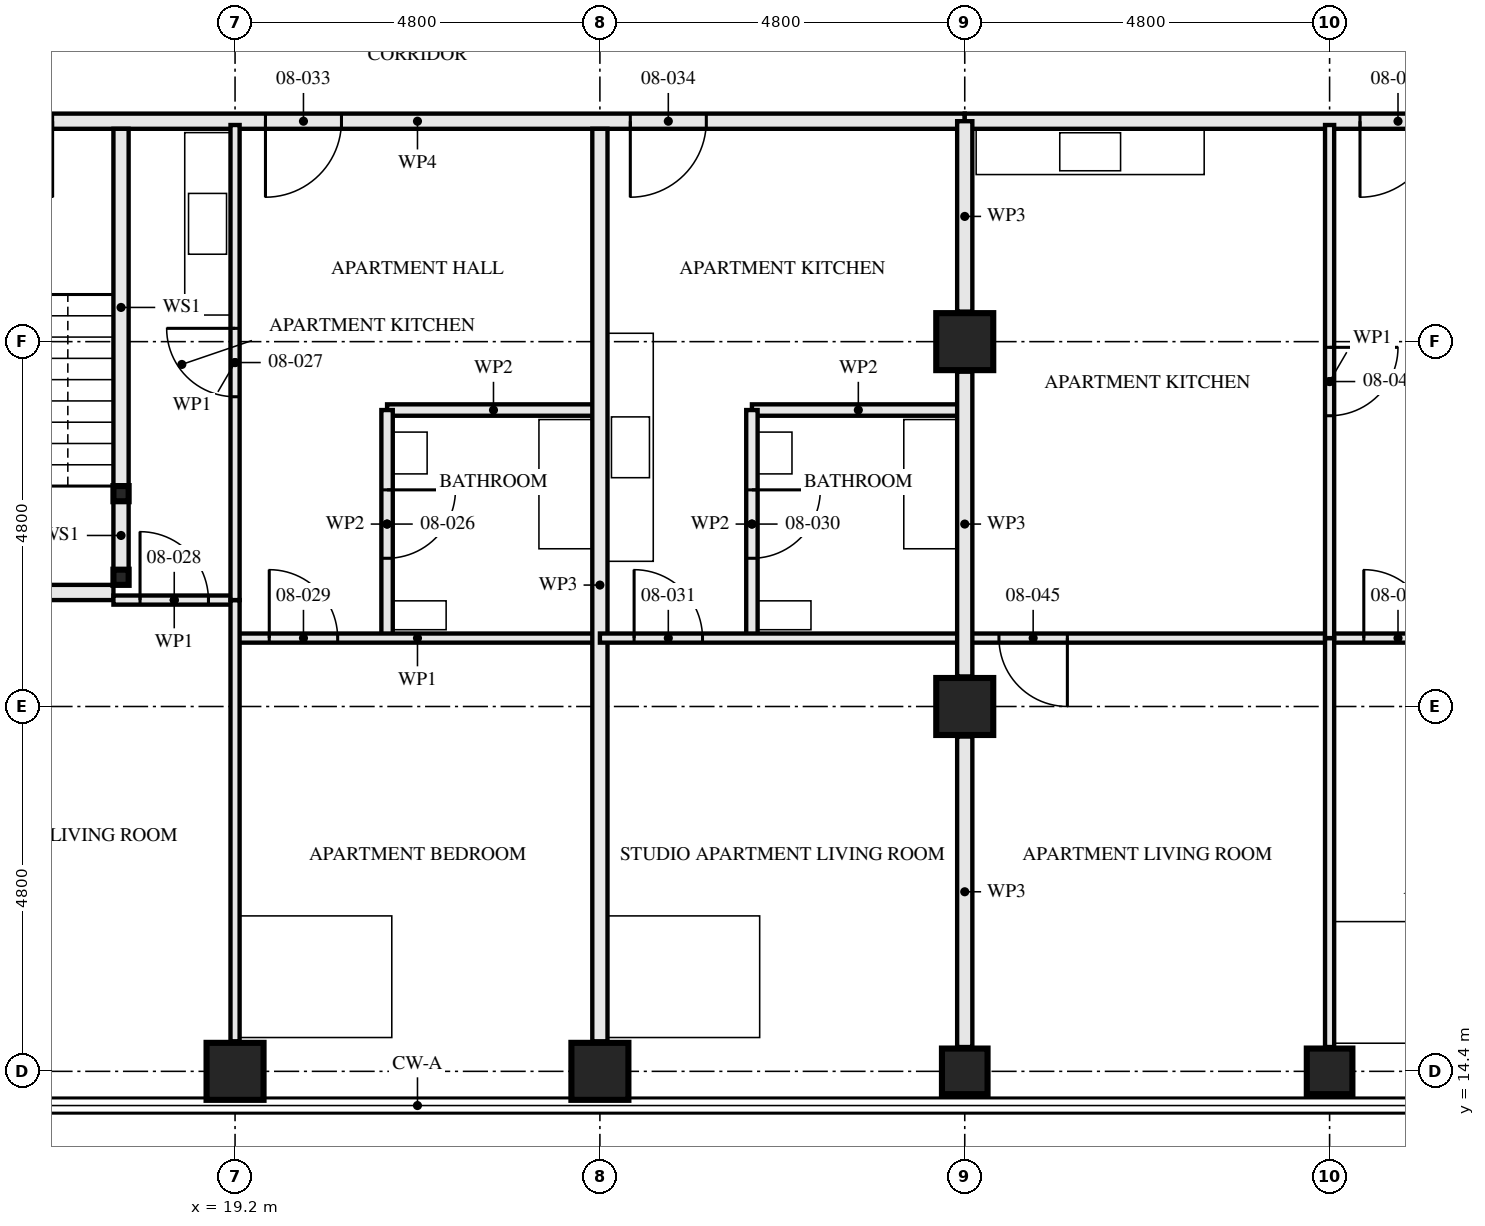
"""IFC4 building model, lengths in metres.
Left out: names, types, materials, properties, quantities, classifications, styles, units other than length and angle.
Written with IfcOpenShell. Run it as: python <this file> out.ifc"""

import sys

from ifc_helpers import new_model, si_unit, direction, frame, frame_2d, origin, origin_2d, place, context, subcontext, project, spatial, rectangle, hollow_rectangle, extrude, element, fill, save


model = new_model("IFC4")
c1 = context("Model", 3, precision=1e-05, world=origin(), true_north=direction((0.0, 1.0)))
c2 = subcontext(c1, "Body", "Model", "MODEL_VIEW")
j1 = project(units=[si_unit("LENGTHUNIT", "METRE"), si_unit("PLANEANGLEUNIT", "RADIAN")], contexts=[c1])
p1 = place(None, origin())
s1 = spatial("IfcSite", under=j1, at=p1, CompositionType="ELEMENT")
p2 = place(p1, origin())
s2 = spatial("IfcBuilding", under=s1, at=p2, CompositionType="ELEMENT")
p3 = place(p2, frame((0.0, 0.0, 34.0)))
s3 = spatial("IfcBuildingStorey", under=s2, at=p3, CompositionType="ELEMENT", Elevation=34.0)
for number, where, z_axis, x_axis in (
    (1, (19.2, 14.4, 0.0), (0.0, 0.0, 1.0), (0.0, 1.0, 0.0)),
    (2, (24.0, 14.4, 0.0), (0.0, 0.0, 1.0), (0.0, 1.0, 0.0)),
):
    element("IfcColumn", number, at=place(p3, frame(where, z_axis=z_axis, x_axis=x_axis)), inside=s3, PredefinedType="COLUMN", context=c2, shape_type="SweptSolid", body=[
        extrude(hollow_rectangle(XDim=0.75, YDim=0.75, WallThickness=0.08, at=origin_2d()), origin(), (0.0, 0.0, 1.0), 3.5),
    ])
p4 = place(p3, frame((28.8, 14.4, 0.0), z_axis=(0.0, 0.0, 1.0), x_axis=(0.0, 1.0, 0.0)))
e3 = element("IfcColumn", 3, at=p4, inside=s3, PredefinedType="COLUMN", context=c2, shape_type="SweptSolid", body=[
    extrude(hollow_rectangle(XDim=0.6, YDim=0.6, WallThickness=0.08, at=origin_2d()), origin(), (0.0, 0.0, 1.0), 3.5),
])
for number, where, z_axis, x_axis in (
    (4, (28.8, 19.2, 0.0), (0.0, 0.0, 1.0), (1.0, 0.0, 0.0)),
    (5, (28.8, 24.0, 0.0), (0.0, 0.0, 1.0), (1.0, 0.0, 0.0)),
):
    element("IfcColumn", number, at=place(p3, frame(where, z_axis=z_axis, x_axis=x_axis)), inside=s3, PredefinedType="COLUMN", context=c2, shape_type="SweptSolid", body=[
        extrude(hollow_rectangle(XDim=0.75, YDim=0.75, WallThickness=0.08, at=origin_2d()), origin(), (0.0, 0.0, 1.0), 3.5),
    ])
p5 = place(p3, frame((33.6, 14.4, 0.0), z_axis=(0.0, 0.0, 1.0), x_axis=(0.0, 1.0, 0.0)))
e6 = element("IfcColumn", 6, at=p5, inside=s3, PredefinedType="COLUMN", context=c2, shape_type="SweptSolid", body=[
    extrude(hollow_rectangle(XDim=0.6, YDim=0.6, WallThickness=0.08, at=origin_2d()), origin(), (0.0, 0.0, 1.0), 3.5),
])
for number, where, z_axis, x_axis in (
    (7, (17.7, 20.9, 0.0), (0.0, 0.0, 1.0), (1.0, 0.0, 0.0)),
    (8, (17.7, 22.0, 0.0), (0.0, 0.0, 1.0), (1.0, 0.0, 0.0)),
):
    element("IfcColumn", number, at=place(p3, frame(where, z_axis=z_axis, x_axis=x_axis)), inside=s3, PredefinedType="COLUMN", context=c2, shape_type="SweptSolid", body=[
        extrude(hollow_rectangle(XDim=0.2, YDim=0.2, WallThickness=0.008, at=origin_2d()), origin(), (0.0, 0.0, 1.0), 3.33),
    ])
p6 = place(p3, frame((17.7, 21.0, 0.0), z_axis=(0.0, 0.0, 1.0), x_axis=(0.0, 1.0, 0.0)))
e9 = element("IfcWall", 9, at=p6, inside=s3, PredefinedType="SOLIDWALL", context=c2, shape_type="SweptSolid", body=[
    extrude(rectangle(XDim=0.9, YDim=0.2, at=frame_2d((0.45, 0.0))), origin(), (0.0, 0.0, 1.0), 2.99),
])
p7 = place(p3, frame((17.7, 22.1, 0.0), z_axis=(0.0, 0.0, 1.0), x_axis=(0.0, 1.0, 0.0)))
e10 = element("IfcWall", 10, at=p7, inside=s3, PredefinedType="SOLIDWALL", context=c2, shape_type="SweptSolid", body=[
    extrude(rectangle(XDim=4.7, YDim=0.2, at=frame_2d((2.35, 0.0))), origin(), (0.0, 0.0, 1.0), 2.99),
])
p8 = place(p3, frame((15.0, 20.7, 0.0), z_axis=(0.0, 0.0, 1.0), x_axis=(1.0, 0.0, 0.0)))
e11 = element("IfcWall", 11, at=p8, inside=s3, PredefinedType="SOLIDWALL", context=c2, shape_type="SweptSolid", body=[
    extrude(rectangle(XDim=2.6, YDim=0.2, at=frame_2d((1.3, 0.0))), origin(), (0.0, 0.0, 1.0), 3.33),
])
p9 = place(p3, frame((21.2, 20.1, 0.0), z_axis=(0.0, 0.0, 1.0), x_axis=(0.0, 1.0, 0.0)))
e12 = element("IfcWall", 12, at=p9, inside=s3, PredefinedType="PARTITIONING", context=c2, shape_type="SweptSolid", body=[
    extrude(rectangle(XDim=3.0, YDim=0.15, at=frame_2d((1.5, 0.0))), origin(), (0.0, 0.0, 1.0), 3.33),
])
p10 = place(p9, frame((1.05, 0.0, 0.0)))
e13 = element("IfcOpeningElement", 13, at=p10, cuts=e12, PredefinedType="OPENING", context=c2, shape_type="SweptSolid", body=[
    extrude(rectangle(XDim=0.9, YDim=2.1, at=frame_2d((0.45, 1.05))), frame((0.0, 0.085, 0.0), z_axis=(0.0, -1.0, 0.0), x_axis=(1.0, 0.0, 0.0)), (0.0, 0.0, 1.0), 0.171),
])
p11 = place(p3, frame((21.2, 23.1, 0.0), z_axis=(0.0, 0.0, 1.0), x_axis=(1.0, 0.0, 0.0)))
e14 = element("IfcWall", 14, at=p11, inside=s3, PredefinedType="PARTITIONING", context=c2, shape_type="SweptSolid", body=[
    extrude(rectangle(XDim=2.8, YDim=0.15, at=frame_2d((1.4, 0.0))), origin(), (0.0, 0.0, 1.0), 3.33),
])
p12 = place(p3, frame((19.2, 20.6, 0.0), z_axis=(0.0, 0.0, 1.0), x_axis=(0.0, 1.0, 0.0)))
e15 = element("IfcWall", 15, at=p12, inside=s3, PredefinedType="PARTITIONING", context=c2, shape_type="SweptSolid", body=[
    extrude(rectangle(XDim=6.25, YDim=0.12, at=frame_2d((3.125, 0.0))), origin(), (0.0, 0.0, 1.0), 2.55),
])
p13 = place(p12, frame((2.675, 0.0, 0.0)))
e16 = element("IfcOpeningElement", 16, at=p13, cuts=e15, PredefinedType="OPENING", context=c2, shape_type="SweptSolid", body=[
    extrude(rectangle(XDim=0.9, YDim=2.1, at=frame_2d((0.45, 1.05))), frame((0.0, 0.071, 0.0), z_axis=(0.0, -1.0, 0.0), x_axis=(1.0, 0.0, 0.0)), (0.0, 0.0, 1.0), 0.141),
])
p14 = place(p3, frame((17.6, 20.6, 0.0), z_axis=(0.0, 0.0, 1.0), x_axis=(1.0, 0.0, 0.0)))
e17 = element("IfcWall", 17, at=p14, inside=s3, PredefinedType="PARTITIONING", context=c2, shape_type="SweptSolid", body=[
    extrude(rectangle(XDim=1.6, YDim=0.12, at=frame_2d((0.8, 0.0))), origin(), (0.0, 0.0, 1.0), 3.33),
])
p15 = place(p14, frame((0.35, 0.0, 0.0)))
e18 = element("IfcOpeningElement", 18, at=p15, cuts=e17, PredefinedType="OPENING", context=c2, shape_type="SweptSolid", body=[
    extrude(rectangle(XDim=0.9, YDim=2.1, at=frame_2d((0.45, 1.05))), frame((0.0, 0.071, 0.0), z_axis=(0.0, -1.0, 0.0), x_axis=(1.0, 0.0, 0.0)), (0.0, 0.0, 1.0), 0.141),
])
p16 = place(p3, frame((19.2, 20.1, 0.0), z_axis=(0.0, 0.0, 1.0), x_axis=(1.0, 0.0, 0.0)))
e19 = element("IfcWall", 19, at=p16, inside=s3, PredefinedType="PARTITIONING", context=c2, shape_type="SweptSolid", body=[
    extrude(rectangle(XDim=4.8, YDim=0.12, at=frame_2d((2.4, 0.0))), origin(), (0.0, 0.0, 1.0), 3.33),
])
p17 = place(p16, frame((0.45, 0.0, 0.0)))
e20 = element("IfcOpeningElement", 20, at=p17, cuts=e19, PredefinedType="OPENING", context=c2, shape_type="SweptSolid", body=[
    extrude(rectangle(XDim=0.9, YDim=2.1, at=frame_2d((0.45, 1.05))), frame((0.0, 0.071, 0.0), z_axis=(0.0, -1.0, 0.0), x_axis=(1.0, 0.0, 0.0)), (0.0, 0.0, 1.0), 0.141),
])
p18 = place(p3, frame((19.2, 14.795, 0.0), z_axis=(0.0, 0.0, 1.0), x_axis=(0.0, 1.0, 0.0)))
e21 = element("IfcWall", 21, at=p18, inside=s3, PredefinedType="PARTITIONING", context=c2, shape_type="SweptSolid", body=[
    extrude(rectangle(XDim=5.805, YDim=0.12, at=frame_2d((2.903, 0.0))), origin(), (0.0, 0.0, 1.0), 2.55),
])
p19 = place(p3, frame((24.0, 14.795, 0.0), z_axis=(0.0, 0.0, 1.0), x_axis=(0.0, 1.0, 0.0)))
e22 = element("IfcWall", 22, at=p19, inside=s3, PredefinedType="PARTITIONING", context=c2, shape_type="SweptSolid", body=[
    extrude(rectangle(XDim=12.005, YDim=0.2, at=frame_2d((6.002, 0.0))), origin(), (0.0, 0.0, 1.0), 2.55),
])
p20 = place(p3, frame((26.0, 20.1, 0.0), z_axis=(0.0, 0.0, 1.0), x_axis=(0.0, 1.0, 0.0)))
e23 = element("IfcWall", 23, at=p20, inside=s3, PredefinedType="PARTITIONING", context=c2, shape_type="SweptSolid", body=[
    extrude(rectangle(XDim=3.0, YDim=0.15, at=frame_2d((1.5, 0.0))), origin(), (0.0, 0.0, 1.0), 3.33),
])
p21 = place(p20, frame((1.05, 0.0, 0.0)))
e24 = element("IfcOpeningElement", 24, at=p21, cuts=e23, PredefinedType="OPENING", context=c2, shape_type="SweptSolid", body=[
    extrude(rectangle(XDim=0.9, YDim=2.1, at=frame_2d((0.45, 1.05))), frame((0.0, 0.085, 0.0), z_axis=(0.0, -1.0, 0.0), x_axis=(1.0, 0.0, 0.0)), (0.0, 0.0, 1.0), 0.171),
])
p22 = place(p3, frame((26.0, 23.1, 0.0), z_axis=(0.0, 0.0, 1.0), x_axis=(1.0, 0.0, 0.0)))
e25 = element("IfcWall", 25, at=p22, inside=s3, PredefinedType="PARTITIONING", context=c2, shape_type="SweptSolid", body=[
    extrude(rectangle(XDim=2.8, YDim=0.15, at=frame_2d((1.4, 0.0))), origin(), (0.0, 0.0, 1.0), 3.33),
])
p23 = place(p3, frame((24.0, 20.1, 0.0), z_axis=(0.0, 0.0, 1.0), x_axis=(1.0, 0.0, 0.0)))
e26 = element("IfcWall", 26, at=p23, inside=s3, PredefinedType="PARTITIONING", context=c2, shape_type="SweptSolid", body=[
    extrude(rectangle(XDim=4.8, YDim=0.12, at=frame_2d((2.4, 0.0))), origin(), (0.0, 0.0, 1.0), 3.33),
])
p24 = place(p23, frame((0.45, 0.0, 0.0)))
e27 = element("IfcOpeningElement", 27, at=p24, cuts=e26, PredefinedType="OPENING", context=c2, shape_type="SweptSolid", body=[
    extrude(rectangle(XDim=0.9, YDim=2.1, at=frame_2d((0.45, 1.05))), frame((0.0, 0.071, 0.0), z_axis=(0.0, -1.0, 0.0), x_axis=(1.0, 0.0, 0.0)), (0.0, 0.0, 1.0), 0.141),
])
p25 = place(p3, frame((14.4, 26.9, 0.0), z_axis=(0.0, 0.0, 1.0), x_axis=(1.0, 0.0, 0.0)))
e28 = element("IfcWall", 28, at=p25, inside=s3, PredefinedType="PARTITIONING", context=c2, shape_type="SweptSolid", body=[
    extrude(rectangle(XDim=14.4, YDim=0.2, at=frame_2d((7.2, 0.0))), origin(), (0.0, 0.0, 1.0), 2.55),
])
p26 = place(p25, frame((1.4, 0.0, 0.0)))
e29 = element("IfcOpeningElement", 29, at=p26, cuts=e28, PredefinedType="OPENING", context=c2, shape_type="SweptSolid", body=[
    extrude(rectangle(XDim=1.0, YDim=2.1, at=frame_2d((0.5, 1.05))), frame((0.0, 0.111, 0.0), z_axis=(0.0, -1.0, 0.0), x_axis=(1.0, 0.0, 0.0)), (0.0, 0.0, 1.0), 0.221),
])
p27 = place(p25, frame((5.2, 0.0, 0.0)))
e30 = element("IfcOpeningElement", 30, at=p27, cuts=e28, PredefinedType="OPENING", context=c2, shape_type="SweptSolid", body=[
    extrude(rectangle(XDim=1.0, YDim=2.1, at=frame_2d((0.5, 1.05))), frame((0.0, 0.111, 0.0), z_axis=(0.0, -1.0, 0.0), x_axis=(1.0, 0.0, 0.0)), (0.0, 0.0, 1.0), 0.221),
])
p28 = place(p25, frame((10.0, 0.0, 0.0)))
e31 = element("IfcOpeningElement", 31, at=p28, cuts=e28, PredefinedType="OPENING", context=c2, shape_type="SweptSolid", body=[
    extrude(rectangle(XDim=1.0, YDim=2.1, at=frame_2d((0.5, 1.05))), frame((0.0, 0.111, 0.0), z_axis=(0.0, -1.0, 0.0), x_axis=(1.0, 0.0, 0.0)), (0.0, 0.0, 1.0), 0.221),
])
p29 = place(p3, frame((33.6, 20.1, 0.0), z_axis=(0.0, 0.0, 1.0), x_axis=(0.0, 1.0, 0.0)))
e32 = element("IfcWall", 32, at=p29, inside=s3, PredefinedType="PARTITIONING", context=c2, shape_type="SweptSolid", body=[
    extrude(rectangle(XDim=6.75, YDim=0.12, at=frame_2d((3.375, 0.0))), origin(), (0.0, 0.0, 1.0), 2.55),
])
p30 = place(p29, frame((2.925, 0.0, 0.0)))
e33 = element("IfcOpeningElement", 33, at=p30, cuts=e32, PredefinedType="OPENING", context=c2, shape_type="SweptSolid", body=[
    extrude(rectangle(XDim=0.9, YDim=2.1, at=frame_2d((0.45, 1.05))), frame((0.0, 0.071, 0.0), z_axis=(0.0, -1.0, 0.0), x_axis=(1.0, 0.0, 0.0)), (0.0, 0.0, 1.0), 0.141),
])
p31 = place(p3, frame((28.8, 20.1, 0.0), z_axis=(0.0, 0.0, 1.0), x_axis=(1.0, 0.0, 0.0)))
e34 = element("IfcWall", 34, at=p31, inside=s3, PredefinedType="PARTITIONING", context=c2, shape_type="SweptSolid", body=[
    extrude(rectangle(XDim=4.8, YDim=0.12, at=frame_2d((2.4, 0.0))), origin(), (0.0, 0.0, 1.0), 3.33),
])
p32 = place(p31, frame((0.45, 0.0, 0.0)))
e35 = element("IfcOpeningElement", 35, at=p32, cuts=e34, PredefinedType="OPENING", context=c2, shape_type="SweptSolid", body=[
    extrude(rectangle(XDim=0.9, YDim=2.1, at=frame_2d((0.45, 1.05))), frame((0.0, 0.071, 0.0), z_axis=(0.0, -1.0, 0.0), x_axis=(1.0, 0.0, 0.0)), (0.0, 0.0, 1.0), 0.141),
])
p33 = place(p3, frame((33.6, 20.1, 0.0), z_axis=(0.0, 0.0, 1.0), x_axis=(1.0, 0.0, 0.0)))
e36 = element("IfcWall", 36, at=p33, inside=s3, PredefinedType="PARTITIONING", context=c2, shape_type="SweptSolid", body=[
    extrude(rectangle(XDim=4.8, YDim=0.12, at=frame_2d((2.4, 0.0))), origin(), (0.0, 0.0, 1.0), 3.33),
])
p34 = place(p33, frame((0.45, 0.0, 0.0)))
e37 = element("IfcOpeningElement", 37, at=p34, cuts=e36, PredefinedType="OPENING", context=c2, shape_type="SweptSolid", body=[
    extrude(rectangle(XDim=0.9, YDim=2.1, at=frame_2d((0.45, 1.05))), frame((0.0, 0.071, 0.0), z_axis=(0.0, -1.0, 0.0), x_axis=(1.0, 0.0, 0.0)), (0.0, 0.0, 1.0), 0.141),
])
p35 = place(p3, frame((33.6, 14.72, 0.0), z_axis=(0.0, 0.0, 1.0), x_axis=(0.0, 1.0, 0.0)))
e38 = element("IfcWall", 38, at=p35, inside=s3, PredefinedType="PARTITIONING", context=c2, shape_type="SweptSolid", body=[
    extrude(rectangle(XDim=5.38, YDim=0.12, at=frame_2d((2.69, 0.0))), origin(), (0.0, 0.0, 1.0), 2.55),
])
p36 = place(p3, frame((28.8, 26.9, 0.0), z_axis=(0.0, 0.0, 1.0), x_axis=(1.0, 0.0, 0.0)))
e39 = element("IfcWall", 39, at=p36, inside=s3, PredefinedType="PARTITIONING", context=c2, shape_type="SweptSolid", body=[
    extrude(rectangle(XDim=9.6, YDim=0.2, at=frame_2d((4.8, 0.0))), origin(), (0.0, 0.0, 1.0), 3.33),
])
p37 = place(p36, frame((5.2, 0.0, 0.0)))
e40 = element("IfcOpeningElement", 40, at=p37, cuts=e39, PredefinedType="OPENING", context=c2, shape_type="SweptSolid", body=[
    extrude(rectangle(XDim=1.0, YDim=2.1, at=frame_2d((0.5, 1.05))), frame((0.0, 0.111, 0.0), z_axis=(0.0, -1.0, 0.0), x_axis=(1.0, 0.0, 0.0)), (0.0, 0.0, 1.0), 0.221),
])
p38 = place(p3, frame((28.8, 14.72, 0.0), z_axis=(0.0, 0.0, 1.0), x_axis=(0.0, 1.0, 0.0)))
e41 = element("IfcWall", 41, at=p38, inside=s3, PredefinedType="PARTITIONING", context=c2, shape_type="SweptSolid", body=[
    extrude(rectangle(XDim=4.085, YDim=0.2, at=frame_2d((2.042, 0.0))), origin(), (0.0, 0.0, 1.0), 2.32),
])
p39 = place(p3, frame((28.8, 19.595, 0.0), z_axis=(0.0, 0.0, 1.0), x_axis=(0.0, 1.0, 0.0)))
e42 = element("IfcWall", 42, at=p39, inside=s3, PredefinedType="PARTITIONING", context=c2, shape_type="SweptSolid", body=[
    extrude(rectangle(XDim=4.01, YDim=0.2, at=frame_2d((2.005, 0.0))), origin(), (0.0, 0.0, 1.0), 2.32),
])
p40 = place(p3, frame((28.8, 24.395, 0.0), z_axis=(0.0, 0.0, 1.0), x_axis=(0.0, 1.0, 0.0)))
e43 = element("IfcWall", 43, at=p40, inside=s3, PredefinedType="PARTITIONING", context=c2, shape_type="SweptSolid", body=[
    extrude(rectangle(XDim=2.505, YDim=0.2, at=frame_2d((1.252, 0.0))), origin(), (0.0, 0.0, 1.0), 2.32),
])
p41 = place(p10, frame((0.9, 0.0, 0.0), z_axis=(0.0, 0.0, 1.0), x_axis=(-1.0, 0.0, 0.0)))
e44 = element("IfcDoor", 44, at=p41, inside=s3, OperationType="SINGLE_SWING_RIGHT", PredefinedType="DOOR", context=c2, shape_type="SweptSolid", body=[
    extrude(rectangle(XDim=0.9, YDim=2.1, at=frame_2d((0.45, 1.05))), frame((0.0, 0.022, 0.0), z_axis=(0.0, -1.0, 0.0), x_axis=(1.0, 0.0, 0.0)), (0.0, 0.0, 1.0), 0.044),
])
fill(e13, e44)
p42 = place(p13, origin())
e45 = element("IfcDoor", 45, at=p42, inside=s3, OperationType="SINGLE_SWING_LEFT", PredefinedType="DOOR", context=c2, shape_type="SweptSolid", body=[
    extrude(rectangle(XDim=0.9, YDim=2.1, at=frame_2d((0.45, 1.05))), frame((0.0, 0.022, 0.0), z_axis=(0.0, -1.0, 0.0), x_axis=(1.0, 0.0, 0.0)), (0.0, 0.0, 1.0), 0.044),
])
fill(e16, e45)
p43 = place(p15, origin())
e46 = element("IfcDoor", 46, at=p43, inside=s3, OperationType="SINGLE_SWING_RIGHT", PredefinedType="DOOR", context=c2, shape_type="SweptSolid", body=[
    extrude(rectangle(XDim=0.9, YDim=2.1, at=frame_2d((0.45, 1.05))), frame((0.0, 0.022, 0.0), z_axis=(0.0, -1.0, 0.0), x_axis=(1.0, 0.0, 0.0)), (0.0, 0.0, 1.0), 0.044),
])
fill(e18, e46)
p44 = place(p17, origin())
e47 = element("IfcDoor", 47, at=p44, inside=s3, OperationType="SINGLE_SWING_RIGHT", PredefinedType="DOOR", context=c2, shape_type="SweptSolid", body=[
    extrude(rectangle(XDim=0.9, YDim=2.1, at=frame_2d((0.45, 1.05))), frame((0.0, 0.022, 0.0), z_axis=(0.0, -1.0, 0.0), x_axis=(1.0, 0.0, 0.0)), (0.0, 0.0, 1.0), 0.044),
])
fill(e20, e47)
p45 = place(p21, frame((0.9, 0.0, 0.0), z_axis=(0.0, 0.0, 1.0), x_axis=(-1.0, 0.0, 0.0)))
e48 = element("IfcDoor", 48, at=p45, inside=s3, OperationType="SINGLE_SWING_RIGHT", PredefinedType="DOOR", context=c2, shape_type="SweptSolid", body=[
    extrude(rectangle(XDim=0.9, YDim=2.1, at=frame_2d((0.45, 1.05))), frame((0.0, 0.022, 0.0), z_axis=(0.0, -1.0, 0.0), x_axis=(1.0, 0.0, 0.0)), (0.0, 0.0, 1.0), 0.044),
])
fill(e24, e48)
p46 = place(p24, origin())
e49 = element("IfcDoor", 49, at=p46, inside=s3, OperationType="SINGLE_SWING_RIGHT", PredefinedType="DOOR", context=c2, shape_type="SweptSolid", body=[
    extrude(rectangle(XDim=0.9, YDim=2.1, at=frame_2d((0.45, 1.05))), frame((0.0, 0.022, 0.0), z_axis=(0.0, -1.0, 0.0), x_axis=(1.0, 0.0, 0.0)), (0.0, 0.0, 1.0), 0.044),
])
fill(e27, e49)
p47 = place(p27, frame((1.0, 0.0, 0.0), z_axis=(0.0, 0.0, 1.0), x_axis=(-1.0, 0.0, 0.0)))
e50 = element("IfcDoor", 50, at=p47, inside=s3, OperationType="SINGLE_SWING_LEFT", PredefinedType="DOOR", context=c2, shape_type="SweptSolid", body=[
    extrude(rectangle(XDim=1.0, YDim=2.1, at=frame_2d((0.5, 1.05))), frame((0.0, 0.027, 0.0), z_axis=(0.0, -1.0, 0.0), x_axis=(1.0, 0.0, 0.0)), (0.0, 0.0, 1.0), 0.054),
])
fill(e30, e50)
p48 = place(p28, frame((1.0, 0.0, 0.0), z_axis=(0.0, 0.0, 1.0), x_axis=(-1.0, 0.0, 0.0)))
e51 = element("IfcDoor", 51, at=p48, inside=s3, OperationType="SINGLE_SWING_LEFT", PredefinedType="DOOR", context=c2, shape_type="SweptSolid", body=[
    extrude(rectangle(XDim=1.0, YDim=2.1, at=frame_2d((0.5, 1.05))), frame((0.0, 0.027, 0.0), z_axis=(0.0, -1.0, 0.0), x_axis=(1.0, 0.0, 0.0)), (0.0, 0.0, 1.0), 0.054),
])
fill(e31, e51)
p49 = place(p30, frame((0.9, 0.0, 0.0), z_axis=(0.0, 0.0, 1.0), x_axis=(-1.0, 0.0, 0.0)))
e52 = element("IfcDoor", 52, at=p49, inside=s3, OperationType="SINGLE_SWING_RIGHT", PredefinedType="DOOR", context=c2, shape_type="SweptSolid", body=[
    extrude(rectangle(XDim=0.9, YDim=2.1, at=frame_2d((0.45, 1.05))), frame((0.0, 0.022, 0.0), z_axis=(0.0, -1.0, 0.0), x_axis=(1.0, 0.0, 0.0)), (0.0, 0.0, 1.0), 0.044),
])
fill(e33, e52)
p50 = place(p32, frame((0.9, 0.0, 0.0), z_axis=(0.0, 0.0, 1.0), x_axis=(-1.0, 0.0, 0.0)))
e53 = element("IfcDoor", 53, at=p50, inside=s3, OperationType="SINGLE_SWING_RIGHT", PredefinedType="DOOR", context=c2, shape_type="SweptSolid", body=[
    extrude(rectangle(XDim=0.9, YDim=2.1, at=frame_2d((0.45, 1.05))), frame((0.0, 0.022, 0.0), z_axis=(0.0, -1.0, 0.0), x_axis=(1.0, 0.0, 0.0)), (0.0, 0.0, 1.0), 0.044),
])
fill(e35, e53)
p51 = place(p34, origin())
e54 = element("IfcDoor", 54, at=p51, inside=s3, OperationType="SINGLE_SWING_RIGHT", PredefinedType="DOOR", context=c2, shape_type="SweptSolid", body=[
    extrude(rectangle(XDim=0.9, YDim=2.1, at=frame_2d((0.45, 1.05))), frame((0.0, 0.022, 0.0), z_axis=(0.0, -1.0, 0.0), x_axis=(1.0, 0.0, 0.0)), (0.0, 0.0, 1.0), 0.044),
])
fill(e37, e54)
p52 = place(p37, frame((1.0, 0.0, 0.0), z_axis=(0.0, 0.0, 1.0), x_axis=(-1.0, 0.0, 0.0)))
e55 = element("IfcDoor", 55, at=p52, inside=s3, OperationType="SINGLE_SWING_LEFT", PredefinedType="DOOR", context=c2, shape_type="SweptSolid", body=[
    extrude(rectangle(XDim=1.0, YDim=2.1, at=frame_2d((0.5, 1.05))), frame((0.0, 0.027, 0.0), z_axis=(0.0, -1.0, 0.0), x_axis=(1.0, 0.0, 0.0)), (0.0, 0.0, 1.0), 0.054),
])
fill(e40, e55)
save(model, sys.argv[1])
